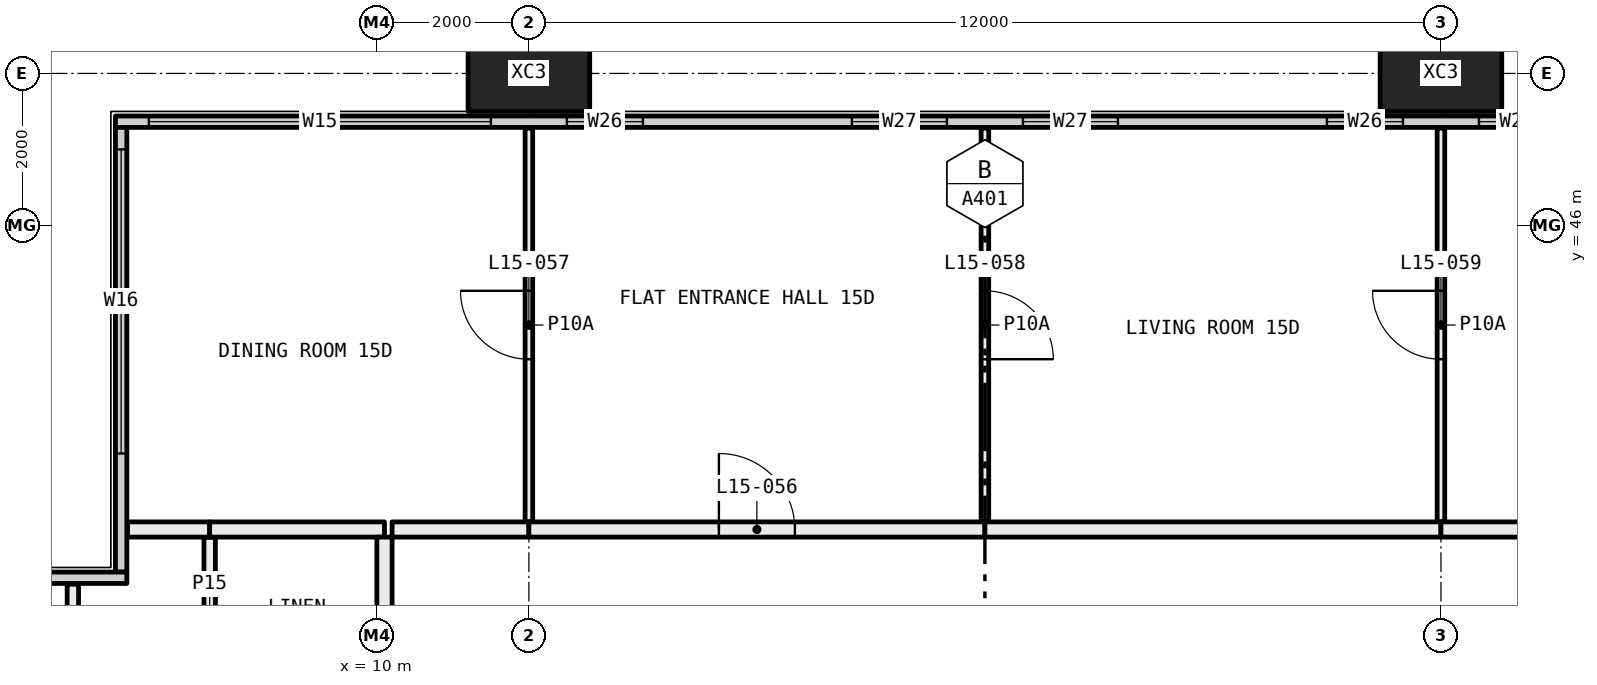
"""IFC4 building model, lengths in metres.
Left out: names, types, materials, properties, quantities, classifications, styles, units other than length and angle.
Written with IfcOpenShell. Run it as: python <this file> out.ifc"""

import sys

from ifc_helpers import new_model, si_unit, direction, frame, frame_2d, origin, origin_2d, place, context, subcontext, project, spatial, rectangle, hollow_rectangle, extrude, element, fill, save


model = new_model("IFC4")
c1 = context("Model", 3, precision=1e-05, world=origin(), true_north=direction((0.0, 1.0)))
c2 = subcontext(c1, "Body", "Model", "MODEL_VIEW")
j1 = project(units=[si_unit("LENGTHUNIT", "METRE"), si_unit("PLANEANGLEUNIT", "RADIAN")], contexts=[c1])
p1 = place(None, origin())
s1 = spatial("IfcSite", under=j1, at=p1, CompositionType="ELEMENT")
p2 = place(p1, origin())
s2 = spatial("IfcBuilding", under=s1, at=p2, CompositionType="ELEMENT")
p3 = place(p2, frame((0.0, 0.0, 64.5)))
s3 = spatial("IfcBuildingStorey", under=s2, at=p3, CompositionType="ELEMENT", Elevation=64.5)
for number, where, z_axis, x_axis in (
    (1, (12.0, 48.0, -0.4), (0.0, 0.0, 1.0), (1.0, 0.0, 0.0)),
    (2, (24.0, 48.0, -0.4), (0.0, 0.0, 1.0), (1.0, 0.0, 0.0)),
):
    element("IfcColumn", number, at=place(p3, frame(where, z_axis=z_axis, x_axis=x_axis)), inside=s3, PredefinedType="COLUMN", context=c2, shape_type="SweptSolid", body=[
        extrude(hollow_rectangle(XDim=1.6, YDim=1.0, WallThickness=0.065, at=origin_2d()), origin(), (0.0, 0.0, 1.0), 3.45),
    ])
p4 = place(p3, frame((6.56, 47.365, 0.0), z_axis=(0.0, 0.0, 1.0), x_axis=(1.0, 0.0, 0.0)))
e3 = element("IfcWall", 3, at=p4, inside=s3, PredefinedType="ELEMENTEDWALL", context=c2, shape_type="SweptSolid", body=[
    extrude(rectangle(XDim=58.88, YDim=0.15, at=frame_2d((29.44, 0.0))), origin(), (0.0, 0.0, 1.0), 3.05),
])
p5 = place(p4, frame((0.44, 0.0, 0.45)))
e4 = element("IfcOpeningElement", 4, at=p5, cuts=e3, PredefinedType="OPENING", context=c2, shape_type="SweptSolid", body=[
    extrude(rectangle(XDim=4.5, YDim=2.55, at=frame_2d((2.25, 1.275))), frame((0.0, 0.085, 0.0), z_axis=(0.0, -1.0, 0.0), x_axis=(1.0, 0.0, 0.0)), (0.0, 0.0, 1.0), 0.17),
])
p6 = place(p4, frame((5.94, 0.0, 0.45)))
e5 = element("IfcOpeningElement", 5, at=p6, cuts=e3, PredefinedType="OPENING", context=c2, shape_type="SweptSolid", body=[
    extrude(rectangle(XDim=1.0, YDim=2.55, at=frame_2d((0.5, 1.275))), frame((0.0, 0.085, 0.0), z_axis=(0.0, -1.0, 0.0), x_axis=(1.0, 0.0, 0.0)), (0.0, 0.0, 1.0), 0.17),
])
p7 = place(p4, frame((9.69, 0.0, 0.45)))
e6 = element("IfcOpeningElement", 6, at=p7, cuts=e3, PredefinedType="OPENING", context=c2, shape_type="SweptSolid", body=[
    extrude(rectangle(XDim=1.25, YDim=2.55, at=frame_2d((0.625, 1.275))), frame((0.0, 0.085, 0.0), z_axis=(0.0, -1.0, 0.0), x_axis=(1.0, 0.0, 0.0)), (0.0, 0.0, 1.0), 0.17),
])
p8 = place(p4, frame((11.94, 0.0, 0.45)))
e7 = element("IfcOpeningElement", 7, at=p8, cuts=e3, PredefinedType="OPENING", context=c2, shape_type="SweptSolid", body=[
    extrude(rectangle(XDim=1.25, YDim=2.55, at=frame_2d((0.625, 1.275))), frame((0.0, 0.085, 0.0), z_axis=(0.0, -1.0, 0.0), x_axis=(1.0, 0.0, 0.0)), (0.0, 0.0, 1.0), 0.17),
])
p9 = place(p4, frame((15.94, 0.0, 0.45)))
e8 = element("IfcOpeningElement", 8, at=p9, cuts=e3, PredefinedType="OPENING", context=c2, shape_type="SweptSolid", body=[
    extrude(rectangle(XDim=1.0, YDim=2.55, at=frame_2d((0.5, 1.275))), frame((0.0, 0.085, 0.0), z_axis=(0.0, -1.0, 0.0), x_axis=(1.0, 0.0, 0.0)), (0.0, 0.0, 1.0), 0.17),
])
p10 = place(p4, frame((17.94, 0.0, 0.45)))
e9 = element("IfcOpeningElement", 9, at=p10, cuts=e3, PredefinedType="OPENING", context=c2, shape_type="SweptSolid", body=[
    extrude(rectangle(XDim=1.0, YDim=2.55, at=frame_2d((0.5, 1.275))), frame((0.0, 0.085, 0.0), z_axis=(0.0, -1.0, 0.0), x_axis=(1.0, 0.0, 0.0)), (0.0, 0.0, 1.0), 0.17),
])
p11 = place(p4, frame((21.69, 0.0, 0.45)))
e10 = element("IfcOpeningElement", 10, at=p11, cuts=e3, PredefinedType="OPENING", context=c2, shape_type="SweptSolid", body=[
    extrude(rectangle(XDim=1.25, YDim=2.55, at=frame_2d((0.625, 1.275))), frame((0.0, 0.085, 0.0), z_axis=(0.0, -1.0, 0.0), x_axis=(1.0, 0.0, 0.0)), (0.0, 0.0, 1.0), 0.17),
])
p12 = place(p4, frame((23.94, 0.0, 0.45)))
e11 = element("IfcOpeningElement", 11, at=p12, cuts=e3, PredefinedType="OPENING", context=c2, shape_type="SweptSolid", body=[
    extrude(rectangle(XDim=1.25, YDim=2.55, at=frame_2d((0.625, 1.275))), frame((0.0, 0.085, 0.0), z_axis=(0.0, -1.0, 0.0), x_axis=(1.0, 0.0, 0.0)), (0.0, 0.0, 1.0), 0.17),
])
p13 = place(p4, frame((27.94, 0.0, 0.45)))
e12 = element("IfcOpeningElement", 12, at=p13, cuts=e3, PredefinedType="OPENING", context=c2, shape_type="SweptSolid", body=[
    extrude(rectangle(XDim=1.0, YDim=2.55, at=frame_2d((0.5, 1.275))), frame((0.0, 0.085, 0.0), z_axis=(0.0, -1.0, 0.0), x_axis=(1.0, 0.0, 0.0)), (0.0, 0.0, 1.0), 0.17),
])
p14 = place(p4, frame((29.94, 0.0, 0.45)))
e13 = element("IfcOpeningElement", 13, at=p14, cuts=e3, PredefinedType="OPENING", context=c2, shape_type="SweptSolid", body=[
    extrude(rectangle(XDim=1.0, YDim=2.55, at=frame_2d((0.5, 1.275))), frame((0.0, 0.085, 0.0), z_axis=(0.0, -1.0, 0.0), x_axis=(1.0, 0.0, 0.0)), (0.0, 0.0, 1.0), 0.17),
])
p15 = place(p4, frame((33.69, 0.0, 0.45)))
e14 = element("IfcOpeningElement", 14, at=p15, cuts=e3, PredefinedType="OPENING", context=c2, shape_type="SweptSolid", body=[
    extrude(rectangle(XDim=1.25, YDim=2.55, at=frame_2d((0.625, 1.275))), frame((0.0, 0.085, 0.0), z_axis=(0.0, -1.0, 0.0), x_axis=(1.0, 0.0, 0.0)), (0.0, 0.0, 1.0), 0.17),
])
p16 = place(p4, frame((35.94, 0.0, 0.45)))
e15 = element("IfcOpeningElement", 15, at=p16, cuts=e3, PredefinedType="OPENING", context=c2, shape_type="SweptSolid", body=[
    extrude(rectangle(XDim=1.25, YDim=2.55, at=frame_2d((0.625, 1.275))), frame((0.0, 0.085, 0.0), z_axis=(0.0, -1.0, 0.0), x_axis=(1.0, 0.0, 0.0)), (0.0, 0.0, 1.0), 0.17),
])
p17 = place(p4, frame((39.94, 0.0, 0.45)))
e16 = element("IfcOpeningElement", 16, at=p17, cuts=e3, PredefinedType="OPENING", context=c2, shape_type="SweptSolid", body=[
    extrude(rectangle(XDim=1.0, YDim=2.55, at=frame_2d((0.5, 1.275))), frame((0.0, 0.085, 0.0), z_axis=(0.0, -1.0, 0.0), x_axis=(1.0, 0.0, 0.0)), (0.0, 0.0, 1.0), 0.17),
])
p18 = place(p4, frame((41.94, 0.0, 0.45)))
e17 = element("IfcOpeningElement", 17, at=p18, cuts=e3, PredefinedType="OPENING", context=c2, shape_type="SweptSolid", body=[
    extrude(rectangle(XDim=1.0, YDim=2.55, at=frame_2d((0.5, 1.275))), frame((0.0, 0.085, 0.0), z_axis=(0.0, -1.0, 0.0), x_axis=(1.0, 0.0, 0.0)), (0.0, 0.0, 1.0), 0.17),
])
p19 = place(p4, frame((45.69, 0.0, 0.45)))
e18 = element("IfcOpeningElement", 18, at=p19, cuts=e3, PredefinedType="OPENING", context=c2, shape_type="SweptSolid", body=[
    extrude(rectangle(XDim=1.25, YDim=2.55, at=frame_2d((0.625, 1.275))), frame((0.0, 0.085, 0.0), z_axis=(0.0, -1.0, 0.0), x_axis=(1.0, 0.0, 0.0)), (0.0, 0.0, 1.0), 0.17),
])
p20 = place(p4, frame((47.94, 0.0, 0.45)))
e19 = element("IfcOpeningElement", 19, at=p20, cuts=e3, PredefinedType="OPENING", context=c2, shape_type="SweptSolid", body=[
    extrude(rectangle(XDim=1.25, YDim=2.55, at=frame_2d((0.625, 1.275))), frame((0.0, 0.085, 0.0), z_axis=(0.0, -1.0, 0.0), x_axis=(1.0, 0.0, 0.0)), (0.0, 0.0, 1.0), 0.17),
])
p21 = place(p4, frame((51.94, 0.0, 0.45)))
e20 = element("IfcOpeningElement", 20, at=p21, cuts=e3, PredefinedType="OPENING", context=c2, shape_type="SweptSolid", body=[
    extrude(rectangle(XDim=1.0, YDim=2.55, at=frame_2d((0.5, 1.275))), frame((0.0, 0.085, 0.0), z_axis=(0.0, -1.0, 0.0), x_axis=(1.0, 0.0, 0.0)), (0.0, 0.0, 1.0), 0.17),
])
p22 = place(p4, frame((53.94, 0.0, 0.45)))
e21 = element("IfcOpeningElement", 21, at=p22, cuts=e3, PredefinedType="OPENING", context=c2, shape_type="SweptSolid", body=[
    extrude(rectangle(XDim=4.5, YDim=2.55, at=frame_2d((2.25, 1.275))), frame((0.0, 0.085, 0.0), z_axis=(0.0, -1.0, 0.0), x_axis=(1.0, 0.0, 0.0)), (0.0, 0.0, 1.0), 0.17),
])
p23 = place(p3, frame((6.635, 41.44, 0.0), z_axis=(0.0, 0.0, 1.0), x_axis=(0.0, 1.0, 0.0)))
e22 = element("IfcWall", 22, at=p23, inside=s3, PredefinedType="ELEMENTEDWALL", context=c2, shape_type="SweptSolid", body=[
    extrude(rectangle(XDim=5.85, YDim=0.15, at=frame_2d((2.925, 0.0))), origin(), (0.0, 0.0, 1.0), 3.05),
])
p24 = place(p23, frame((1.56, 0.0, 0.45)))
e23 = element("IfcOpeningElement", 23, at=p24, cuts=e22, PredefinedType="OPENING", context=c2, shape_type="SweptSolid", body=[
    extrude(rectangle(XDim=4.0, YDim=2.55, at=frame_2d((2.0, 1.275))), frame((0.0, 0.085, 0.0), z_axis=(0.0, -1.0, 0.0), x_axis=(1.0, 0.0, 0.0)), (0.0, 0.0, 1.0), 0.17),
])
p25 = place(p3, frame((0.56, 41.365, 0.0), z_axis=(0.0, 0.0, 1.0), x_axis=(1.0, 0.0, 0.0)))
e24 = element("IfcWall", 24, at=p25, inside=s3, PredefinedType="ELEMENTEDWALL", context=c2, shape_type="SweptSolid", body=[
    extrude(rectangle(XDim=6.15, YDim=0.15, at=frame_2d((3.075, 0.0))), origin(), (0.0, 0.0, 1.0), 3.05),
])
p26 = place(p25, frame((0.44, 0.0, 0.45)))
e25 = element("IfcOpeningElement", 25, at=p26, cuts=e24, PredefinedType="OPENING", context=c2, shape_type="SweptSolid", body=[
    extrude(rectangle(XDim=4.0, YDim=2.55, at=frame_2d((2.0, 1.275))), frame((0.0, 0.085, 0.0), z_axis=(0.0, -1.0, 0.0), x_axis=(1.0, 0.0, 0.0)), (0.0, 0.0, 1.0), 0.17),
])
p27 = place(p3, frame((6.0, 39.0, 0.0), z_axis=(0.0, 0.0, 1.0), x_axis=(0.0, 1.0, 0.0)))
e26 = element("IfcWall", 26, at=p27, inside=s3, PredefinedType="PARTITIONING", context=c2, shape_type="SweptSolid", body=[
    extrude(rectangle(XDim=2.28, YDim=0.15, at=frame_2d((1.14, 0.0))), origin(), (0.0, 0.0, 1.0), 3.05),
])
p28 = place(p27, frame((0.69, 0.0, 0.0)))
e27 = element("IfcOpeningElement", 27, at=p28, cuts=e26, PredefinedType="OPENING", context=c2, shape_type="SweptSolid", body=[
    extrude(rectangle(XDim=0.9, YDim=2.1, at=frame_2d((0.45, 1.05))), frame((0.0, 0.085, 0.0), z_axis=(0.0, -1.0, 0.0), x_axis=(1.0, 0.0, 0.0)), (0.0, 0.0, 1.0), 0.17),
])
p29 = place(p3, frame((7.8, 39.075, 0.0), z_axis=(0.0, 0.0, 1.0), x_axis=(0.0, 1.0, 0.0)))
e28 = element("IfcWall", 28, at=p29, inside=s3, PredefinedType="PARTITIONING", context=c2, shape_type="SweptSolid", body=[
    extrude(rectangle(XDim=2.825, YDim=0.15, at=frame_2d((1.413, 0.0))), origin(), (0.0, 0.0, 1.0), 3.05),
])
p30 = place(p3, frame((7.8, 42.0, 0.0), z_axis=(0.0, 0.0, 1.0), x_axis=(-1.0, 0.0, 0.0)))
e29 = element("IfcWall", 29, at=p30, inside=s3, PredefinedType="PARTITIONING", context=c2, shape_type="SweptSolid", body=[
    extrude(rectangle(XDim=1.08, YDim=0.2, at=frame_2d((0.54, 0.0))), origin(), (0.0, 0.0, 1.0), 3.05),
])
p31 = place(p3, frame((10.1, 42.0, 0.0), z_axis=(0.0, 0.0, 1.0), x_axis=(-1.0, 0.0, 0.0)))
e30 = element("IfcWall", 30, at=p31, inside=s3, PredefinedType="PARTITIONING", context=c2, shape_type="SweptSolid", body=[
    extrude(rectangle(XDim=2.3, YDim=0.2, at=frame_2d((1.15, 0.0))), origin(), (0.0, 0.0, 1.0), 3.05),
])
p32 = place(p3, frame((10.1, 39.0, 0.0), z_axis=(0.0, 0.0, 1.0), x_axis=(0.0, 1.0, 0.0)))
e31 = element("IfcWall", 31, at=p32, inside=s3, PredefinedType="PARTITIONING", context=c2, shape_type="SweptSolid", body=[
    extrude(rectangle(XDim=2.9, YDim=0.2, at=frame_2d((1.45, 0.0))), origin(), (0.0, 0.0, 1.0), 3.05),
])
p33 = place(p3, frame((12.0, 42.1, 0.0), z_axis=(0.0, 0.0, 1.0), x_axis=(0.0, 1.0, 0.0)))
e32 = element("IfcWall", 32, at=p33, inside=s3, PredefinedType="PARTITIONING", context=c2, shape_type="SweptSolid", body=[
    extrude(rectangle(XDim=5.18, YDim=0.1, at=frame_2d((2.59, 0.0))), origin(), (0.0, 0.0, 1.0), 3.05),
])
p34 = place(p33, frame((2.14, 0.0, 0.0)))
e33 = element("IfcOpeningElement", 33, at=p34, cuts=e32, PredefinedType="OPENING", context=c2, shape_type="SweptSolid", body=[
    extrude(rectangle(XDim=0.9, YDim=2.1, at=frame_2d((0.45, 1.05))), frame((0.0, 0.06, 0.0), z_axis=(0.0, -1.0, 0.0), x_axis=(1.0, 0.0, 0.0)), (0.0, 0.0, 1.0), 0.12),
])
p35 = place(p3, frame((10.2, 42.0, 0.0), z_axis=(0.0, 0.0, 1.0), x_axis=(1.0, 0.0, 0.0)))
e34 = element("IfcWall", 34, at=p35, inside=s3, PredefinedType="PARTITIONING", context=c2, shape_type="SweptSolid", body=[
    extrude(rectangle(XDim=1.8, YDim=0.2, at=frame_2d((0.9, 0.0))), origin(), (0.0, 0.0, 1.0), 3.05),
])
p36 = place(p3, frame((18.0, 42.1, 0.0), z_axis=(0.0, 0.0, 1.0), x_axis=(0.0, 1.0, 0.0)))
e35 = element("IfcWall", 35, at=p36, inside=s3, PredefinedType="PARTITIONING", context=c2, shape_type="SweptSolid", body=[
    extrude(rectangle(XDim=5.18, YDim=0.1, at=frame_2d((2.59, 0.0))), origin(), (0.0, 0.0, 1.0), 3.05),
])
p37 = place(p36, frame((2.14, 0.0, 0.0)))
e36 = element("IfcOpeningElement", 36, at=p37, cuts=e35, PredefinedType="OPENING", context=c2, shape_type="SweptSolid", body=[
    extrude(rectangle(XDim=0.9, YDim=2.1, at=frame_2d((0.45, 1.05))), frame((0.0, 0.06, 0.0), z_axis=(0.0, -1.0, 0.0), x_axis=(1.0, 0.0, 0.0)), (0.0, 0.0, 1.0), 0.12),
])
p38 = place(p3, frame((12.0, 42.0, 0.0), z_axis=(0.0, 0.0, 1.0), x_axis=(1.0, 0.0, 0.0)))
e37 = element("IfcWall", 37, at=p38, inside=s3, PredefinedType="PARTITIONING", context=c2, shape_type="SweptSolid", body=[
    extrude(rectangle(XDim=6.0, YDim=0.2, at=frame_2d((3.0, 0.0))), origin(), (0.0, 0.0, 1.0), 3.05),
])
p39 = place(p38, frame((2.5, 0.0, 0.0)))
e38 = element("IfcOpeningElement", 38, at=p39, cuts=e37, PredefinedType="OPENING", context=c2, shape_type="SweptSolid", body=[
    extrude(rectangle(XDim=1.0, YDim=2.1, at=frame_2d((0.5, 1.05))), frame((0.0, 0.11, 0.0), z_axis=(0.0, -1.0, 0.0), x_axis=(1.0, 0.0, 0.0)), (0.0, 0.0, 1.0), 0.22),
])
p40 = place(p3, frame((24.0, 42.1, 0.0), z_axis=(0.0, 0.0, 1.0), x_axis=(0.0, 1.0, 0.0)))
e39 = element("IfcWall", 39, at=p40, inside=s3, PredefinedType="PARTITIONING", context=c2, shape_type="SweptSolid", body=[
    extrude(rectangle(XDim=5.18, YDim=0.1, at=frame_2d((2.59, 0.0))), origin(), (0.0, 0.0, 1.0), 3.05),
])
p41 = place(p40, frame((2.14, 0.0, 0.0)))
e40 = element("IfcOpeningElement", 40, at=p41, cuts=e39, PredefinedType="OPENING", context=c2, shape_type="SweptSolid", body=[
    extrude(rectangle(XDim=0.9, YDim=2.1, at=frame_2d((0.45, 1.05))), frame((0.0, 0.06, 0.0), z_axis=(0.0, -1.0, 0.0), x_axis=(1.0, 0.0, 0.0)), (0.0, 0.0, 1.0), 0.12),
])
p42 = place(p3, frame((18.0, 42.0, 0.0), z_axis=(0.0, 0.0, 1.0), x_axis=(1.0, 0.0, 0.0)))
e41 = element("IfcWall", 41, at=p42, inside=s3, PredefinedType="PARTITIONING", context=c2, shape_type="SweptSolid", body=[
    extrude(rectangle(XDim=6.0, YDim=0.2, at=frame_2d((3.0, 0.0))), origin(), (0.0, 0.0, 1.0), 3.05),
])
p43 = place(p3, frame((24.0, 42.0, 0.0), z_axis=(0.0, 0.0, 1.0), x_axis=(1.0, 0.0, 0.0)))
e42 = element("IfcWall", 42, at=p43, inside=s3, PredefinedType="PARTITIONING", context=c2, shape_type="SweptSolid", body=[
    extrude(rectangle(XDim=1.9, YDim=0.2, at=frame_2d((0.95, 0.0))), origin(), (0.0, 0.0, 1.0), 3.05),
])
p44 = place(p5, origin())
e43 = element("IfcWindow", 43, at=p44, inside=s3, PartitioningType="SINGLE_PANEL", PredefinedType="WINDOW", context=c2, shape_type="SweptSolid", body=[
    extrude(rectangle(XDim=4.5, YDim=2.55, at=frame_2d((2.25, 1.275))), frame((0.0, 0.03, 0.0), z_axis=(0.0, -1.0, 0.0), x_axis=(1.0, 0.0, 0.0)), (0.0, 0.0, 1.0), 0.06),
])
fill(e4, e43)
p45 = place(p6, origin())
e44 = element("IfcWindow", 44, at=p45, inside=s3, PartitioningType="SINGLE_PANEL", PredefinedType="WINDOW", context=c2, shape_type="SweptSolid", body=[
    extrude(rectangle(XDim=1.0, YDim=2.55, at=frame_2d((0.5, 1.275))), frame((0.0, 0.03, 0.0), z_axis=(0.0, -1.0, 0.0), x_axis=(1.0, 0.0, 0.0)), (0.0, 0.0, 1.0), 0.06),
])
fill(e5, e44)
p46 = place(p7, origin())
e45 = element("IfcWindow", 45, at=p46, inside=s3, PartitioningType="SINGLE_PANEL", PredefinedType="WINDOW", context=c2, shape_type="SweptSolid", body=[
    extrude(rectangle(XDim=1.25, YDim=2.55, at=frame_2d((0.625, 1.275))), frame((0.0, 0.03, 0.0), z_axis=(0.0, -1.0, 0.0), x_axis=(1.0, 0.0, 0.0)), (0.0, 0.0, 1.0), 0.06),
])
fill(e6, e45)
p47 = place(p8, origin())
e46 = element("IfcWindow", 46, at=p47, inside=s3, PartitioningType="SINGLE_PANEL", PredefinedType="WINDOW", context=c2, shape_type="SweptSolid", body=[
    extrude(rectangle(XDim=1.25, YDim=2.55, at=frame_2d((0.625, 1.275))), frame((0.0, 0.03, 0.0), z_axis=(0.0, -1.0, 0.0), x_axis=(1.0, 0.0, 0.0)), (0.0, 0.0, 1.0), 0.06),
])
fill(e7, e46)
p48 = place(p9, origin())
e47 = element("IfcWindow", 47, at=p48, inside=s3, PartitioningType="SINGLE_PANEL", PredefinedType="WINDOW", context=c2, shape_type="SweptSolid", body=[
    extrude(rectangle(XDim=1.0, YDim=2.55, at=frame_2d((0.5, 1.275))), frame((0.0, 0.03, 0.0), z_axis=(0.0, -1.0, 0.0), x_axis=(1.0, 0.0, 0.0)), (0.0, 0.0, 1.0), 0.06),
])
fill(e8, e47)
p49 = place(p10, origin())
e48 = element("IfcWindow", 48, at=p49, inside=s3, PartitioningType="SINGLE_PANEL", PredefinedType="WINDOW", context=c2, shape_type="SweptSolid", body=[
    extrude(rectangle(XDim=1.0, YDim=2.55, at=frame_2d((0.5, 1.275))), frame((0.0, 0.03, 0.0), z_axis=(0.0, -1.0, 0.0), x_axis=(1.0, 0.0, 0.0)), (0.0, 0.0, 1.0), 0.06),
])
fill(e9, e48)
p50 = place(p24, origin())
e49 = element("IfcWindow", 49, at=p50, inside=s3, PartitioningType="SINGLE_PANEL", PredefinedType="WINDOW", context=c2, shape_type="SweptSolid", body=[
    extrude(rectangle(XDim=4.0, YDim=2.55, at=frame_2d((2.0, 1.275))), frame((0.0, 0.03, 0.0), z_axis=(0.0, -1.0, 0.0), x_axis=(1.0, 0.0, 0.0)), (0.0, 0.0, 1.0), 0.06),
])
fill(e23, e49)
p51 = place(p39, origin())
e50 = element("IfcDoor", 50, at=p51, inside=s3, OperationType="SINGLE_SWING_RIGHT", PredefinedType="DOOR", context=c2, shape_type="SweptSolid", body=[
    extrude(rectangle(XDim=1.0, YDim=2.1, at=frame_2d((0.5, 1.05))), frame((0.0, 0.025, 0.0), z_axis=(0.0, -1.0, 0.0), x_axis=(1.0, 0.0, 0.0)), (0.0, 0.0, 1.0), 0.05),
])
fill(e38, e50)
p52 = place(p34, origin())
e51 = element("IfcDoor", 51, at=p52, inside=s3, OperationType="SINGLE_SWING_LEFT", PredefinedType="DOOR", context=c2, shape_type="SweptSolid", body=[
    extrude(rectangle(XDim=0.9, YDim=2.1, at=frame_2d((0.45, 1.05))), frame((0.0, 0.025, 0.0), z_axis=(0.0, -1.0, 0.0), x_axis=(1.0, 0.0, 0.0)), (0.0, 0.0, 1.0), 0.05),
])
fill(e33, e51)
p53 = place(p37, frame((0.9, 0.0, 0.0), x_axis=(-1.0, 0.0, 0.0)))
e52 = element("IfcDoor", 52, at=p53, inside=s3, OperationType="SINGLE_SWING_LEFT", PredefinedType="DOOR", context=c2, shape_type="SweptSolid", body=[
    extrude(rectangle(XDim=0.9, YDim=2.1, at=frame_2d((0.45, 1.05))), frame((0.0, 0.025, 0.0), z_axis=(0.0, -1.0, 0.0), x_axis=(1.0, 0.0, 0.0)), (0.0, 0.0, 1.0), 0.05),
])
fill(e36, e52)
p54 = place(p41, origin())
e53 = element("IfcDoor", 53, at=p54, inside=s3, OperationType="SINGLE_SWING_LEFT", PredefinedType="DOOR", context=c2, shape_type="SweptSolid", body=[
    extrude(rectangle(XDim=0.9, YDim=2.1, at=frame_2d((0.45, 1.05))), frame((0.0, 0.025, 0.0), z_axis=(0.0, -1.0, 0.0), x_axis=(1.0, 0.0, 0.0)), (0.0, 0.0, 1.0), 0.05),
])
fill(e40, e53)
save(model, sys.argv[1])
